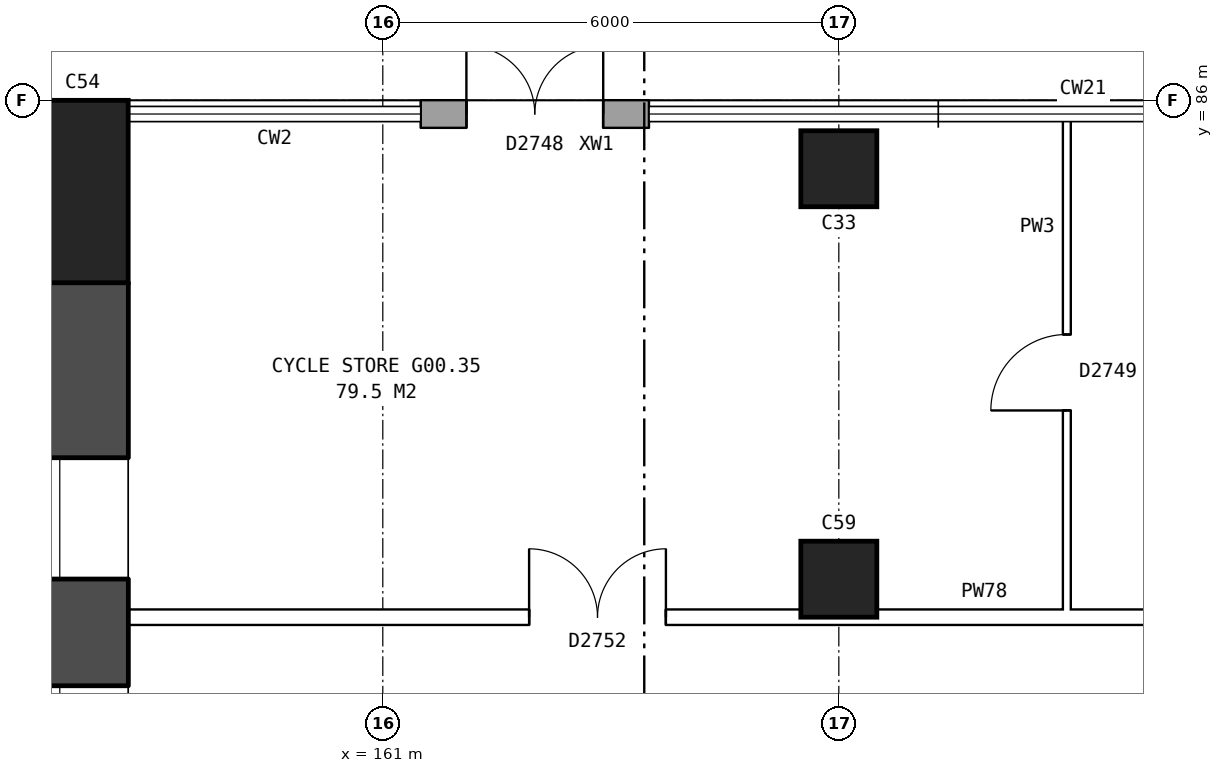
"""IFC4 building model, lengths in metres.
Left out: names, types, materials, properties, quantities, classifications, styles, units other than length and angle.
Written with IfcOpenShell. Run it as: python <this file> out.ifc"""

import sys

from ifc_helpers import new_model, si_unit, direction, frame, frame_2d, origin, origin_2d, place, context, subcontext, project, spatial, rectangle, extrude, element, fill, save


model = new_model("IFC4")
c1 = context("Model", 3, precision=1e-05, world=origin(), true_north=direction((0.0, 1.0)))
c2 = subcontext(c1, "Body", "Model", "MODEL_VIEW")
j1 = project(units=[si_unit("LENGTHUNIT", "METRE"), si_unit("PLANEANGLEUNIT", "RADIAN")], contexts=[c1])
p1 = place(None, origin())
s1 = spatial("IfcSite", under=j1, at=p1, CompositionType="ELEMENT")
p2 = place(p1, origin())
s2 = spatial("IfcBuilding", under=s1, at=p2, CompositionType="ELEMENT")
p3 = place(p2, origin())
s3 = spatial("IfcBuildingStorey", under=s2, at=p3, CompositionType="ELEMENT", Elevation=0.0)
p4 = place(p3, frame((157.05, 84.8, -0.35), z_axis=(0.0, 0.0, 1.0), x_axis=(1.0, 0.0, 0.0)))
e1 = element("IfcColumn", 1, at=p4, inside=s3, PredefinedType="COLUMN", context=c2, shape_type="SweptSolid", body=[
    extrude(rectangle(XDim=1.2, YDim=2.4, at=origin_2d()), origin(), (0.0, 0.0, 1.0), 5.55),
])
p5 = place(p3, frame((157.05, 56.4, -0.35), z_axis=(0.0, 0.0, 1.0), x_axis=(0.0, 1.0, 0.0)))
e2 = element("IfcWall", 2, at=p5, inside=s3, PredefinedType="SHEAR", context=c2, shape_type="SweptSolid", body=[
    extrude(rectangle(XDim=27.2, YDim=1.2, at=frame_2d((13.6, 0.0))), origin(), (0.0, 0.0, 1.0), 5.55),
])
p6 = place(p5, frame((2.3, 0.0, 0.8)))
e3 = element("IfcOpeningElement", 3, at=p6, cuts=e2, PredefinedType="OPENING", context=c2, shape_type="SweptSolid", body=[
    extrude(rectangle(XDim=1.6, YDim=1.8, at=frame_2d((0.8, 0.9))), frame((0.0, 0.61, 0.0), z_axis=(0.0, -1.0, 0.0), x_axis=(1.0, 0.0, 0.0)), (0.0, 0.0, 1.0), 1.22),
])
p7 = place(p5, frame((5.3, 0.0, 0.8)))
e4 = element("IfcOpeningElement", 4, at=p7, cuts=e2, PredefinedType="OPENING", context=c2, shape_type="SweptSolid", body=[
    extrude(rectangle(XDim=1.6, YDim=1.8, at=frame_2d((0.8, 0.9))), frame((0.0, 0.61, 0.0), z_axis=(0.0, -1.0, 0.0), x_axis=(1.0, 0.0, 0.0)), (0.0, 0.0, 1.0), 1.22),
])
p8 = place(p5, frame((8.3, 0.0, 0.8)))
e5 = element("IfcOpeningElement", 5, at=p8, cuts=e2, PredefinedType="OPENING", context=c2, shape_type="SweptSolid", body=[
    extrude(rectangle(XDim=1.6, YDim=1.8, at=frame_2d((0.8, 0.9))), frame((0.0, 0.61, 0.0), z_axis=(0.0, -1.0, 0.0), x_axis=(1.0, 0.0, 0.0)), (0.0, 0.0, 1.0), 1.22),
])
p9 = place(p5, frame((11.3, 0.0, 0.8)))
e6 = element("IfcOpeningElement", 6, at=p9, cuts=e2, PredefinedType="OPENING", context=c2, shape_type="SweptSolid", body=[
    extrude(rectangle(XDim=1.6, YDim=1.8, at=frame_2d((0.8, 0.9))), frame((0.0, 0.61, 0.0), z_axis=(0.0, -1.0, 0.0), x_axis=(1.0, 0.0, 0.0)), (0.0, 0.0, 1.0), 1.22),
])
p10 = place(p5, frame((14.3, 0.0, 0.8)))
e7 = element("IfcOpeningElement", 7, at=p10, cuts=e2, PredefinedType="OPENING", context=c2, shape_type="SweptSolid", body=[
    extrude(rectangle(XDim=1.6, YDim=1.8, at=frame_2d((0.8, 0.9))), frame((0.0, 0.61, 0.0), z_axis=(0.0, -1.0, 0.0), x_axis=(1.0, 0.0, 0.0)), (0.0, 0.0, 1.0), 1.22),
])
p11 = place(p5, frame((17.3, 0.0, 0.8)))
e8 = element("IfcOpeningElement", 8, at=p11, cuts=e2, PredefinedType="OPENING", context=c2, shape_type="SweptSolid", body=[
    extrude(rectangle(XDim=1.6, YDim=1.8, at=frame_2d((0.8, 0.9))), frame((0.0, 0.61, 0.0), z_axis=(0.0, -1.0, 0.0), x_axis=(1.0, 0.0, 0.0)), (0.0, 0.0, 1.0), 1.22),
])
p12 = place(p5, frame((20.3, 0.0, 0.8)))
e9 = element("IfcOpeningElement", 9, at=p12, cuts=e2, PredefinedType="OPENING", context=c2, shape_type="SweptSolid", body=[
    extrude(rectangle(XDim=1.6, YDim=1.8, at=frame_2d((0.8, 0.9))), frame((0.0, 0.61, 0.0), z_axis=(0.0, -1.0, 0.0), x_axis=(1.0, 0.0, 0.0)), (0.0, 0.0, 1.0), 1.22),
])
p13 = place(p5, frame((23.3, 0.0, 0.8)))
e10 = element("IfcOpeningElement", 10, at=p13, cuts=e2, PredefinedType="OPENING", context=c2, shape_type="SweptSolid", body=[
    extrude(rectangle(XDim=1.6, YDim=1.8, at=frame_2d((0.8, 0.9))), frame((0.0, 0.61, 0.0), z_axis=(0.0, -1.0, 0.0), x_axis=(1.0, 0.0, 0.0)), (0.0, 0.0, 1.0), 1.22),
])
for number, where, z_axis, x_axis in (
    (11, (167.0, 79.7, -0.35), (0.0, 0.0, 1.0), (1.0, 0.0, 0.0)),
    (12, (167.0, 85.1, -0.35), (0.0, 0.0, 1.0), (1.0, 0.0, 0.0)),
):
    element("IfcColumn", number, at=place(p3, frame(where, z_axis=z_axis, x_axis=x_axis)), inside=s3, PredefinedType="COLUMN", context=c2, shape_type="SweptSolid", body=[
        extrude(rectangle(XDim=1.0, YDim=1.0, at=origin_2d()), origin(), (0.0, 0.0, 1.0), 5.55),
    ])
p14 = place(p3, frame((164.5, 85.82, 0.0), z_axis=(0.0, 0.0, 1.0), x_axis=(-1.0, 0.0, 0.0)))
e13 = element("IfcWall", 13, at=p14, inside=s3, PredefinedType="STANDARD", context=c2, shape_type="SweptSolid", body=[
    extrude(rectangle(XDim=3.0, YDim=0.36, at=frame_2d((1.5, 0.0))), origin(), (0.0, 0.0, 1.0), 5.2),
])
p15 = place(p14, frame((0.6, 0.0, 0.0)))
e14 = element("IfcOpeningElement", 14, at=p15, cuts=e13, PredefinedType="OPENING", context=c2, shape_type="SweptSolid", body=[
    extrude(rectangle(XDim=1.8, YDim=2.4, at=frame_2d((0.9, 1.2))), frame((0.0, 0.19, 0.0), z_axis=(0.0, -1.0, 0.0), x_axis=(1.0, 0.0, 0.0)), (0.0, 0.0, 1.0), 0.38),
])
p16 = place(p3, frame((157.53, 79.2, 0.0), z_axis=(0.0, 0.0, 1.0), x_axis=(1.0, 0.0, 0.0)))
e15 = element("IfcWall", 15, at=p16, inside=s3, PredefinedType="PARTITIONING", context=c2, shape_type="SweptSolid", body=[
    extrude(rectangle(XDim=15.572, YDim=0.2, at=frame_2d((7.786, 0.0))), origin(), (0.0, 0.0, 1.0), 5.2),
])
p17 = place(p16, frame((5.395, 0.0, 0.0)))
e16 = element("IfcOpeningElement", 16, at=p17, cuts=e15, PredefinedType="OPENING", context=c2, shape_type="SweptSolid", body=[
    extrude(rectangle(XDim=1.8, YDim=2.1, at=frame_2d((0.9, 1.05))), frame((0.0, 0.11, 0.0), z_axis=(0.0, -1.0, 0.0), x_axis=(1.0, 0.0, 0.0)), (0.0, 0.0, 1.0), 0.22),
])
p18 = place(p3, frame((170.0, 79.1, 0.0), z_axis=(0.0, 0.0, 1.0), x_axis=(0.0, 1.0, 0.0)))
e17 = element("IfcWall", 17, at=p18, inside=s3, PredefinedType="PARTITIONING", context=c2, shape_type="SweptSolid", body=[
    extrude(rectangle(XDim=6.66, YDim=0.1, at=frame_2d((3.33, 0.0))), origin(), (0.0, 0.0, 1.0), 5.2),
])
p19 = place(p18, frame((2.82, 0.0, 0.0)))
e18 = element("IfcOpeningElement", 18, at=p19, cuts=e17, PredefinedType="OPENING", context=c2, shape_type="SweptSolid", body=[
    extrude(rectangle(XDim=1.0, YDim=2.1, at=frame_2d((0.5, 1.05))), frame((0.0, 0.06, 0.0), z_axis=(0.0, -1.0, 0.0), x_axis=(1.0, 0.0, 0.0)), (0.0, 0.0, 1.0), 0.12),
])
p20 = place(p15, frame((1.8, 0.0, 0.0), z_axis=(0.0, 0.0, 1.0), x_axis=(-1.0, 0.0, 0.0)))
e19 = element("IfcDoor", 19, at=p20, inside=s3, OperationType="DOUBLE_DOOR_SINGLE_SWING", PredefinedType="DOOR", context=c2, shape_type="SweptSolid", body=[
    extrude(rectangle(XDim=1.8, YDim=2.4, at=frame_2d((0.9, 1.2))), frame((0.0, 0.025, 0.0), z_axis=(0.0, -1.0, 0.0), x_axis=(1.0, 0.0, 0.0)), (0.0, 0.0, 1.0), 0.05),
])
fill(e14, e19)
p21 = place(p12, origin())
e20 = element("IfcWindow", 20, at=p21, inside=s3, PartitioningType="SINGLE_PANEL", PredefinedType="WINDOW", context=c2, shape_type="SweptSolid", body=[
    extrude(rectangle(XDim=1.6, YDim=1.8, at=frame_2d((0.8, 0.9))), frame((0.0, 0.33, 0.0), z_axis=(0.0, -1.0, 0.0), x_axis=(1.0, 0.0, 0.0)), (0.0, 0.0, 1.0), 0.06),
])
fill(e9, e20)
p22 = place(p13, origin())
e21 = element("IfcWindow", 21, at=p22, inside=s3, PartitioningType="SINGLE_PANEL", PredefinedType="WINDOW", context=c2, shape_type="SweptSolid", body=[
    extrude(rectangle(XDim=1.6, YDim=1.8, at=frame_2d((0.8, 0.9))), frame((0.0, 0.33, 0.0), z_axis=(0.0, -1.0, 0.0), x_axis=(1.0, 0.0, 0.0)), (0.0, 0.0, 1.0), 0.06),
])
fill(e10, e21)
p23 = place(p17, origin())
e22 = element("IfcDoor", 22, at=p23, inside=s3, OperationType="DOUBLE_DOOR_SINGLE_SWING", PredefinedType="DOOR", context=c2, shape_type="SweptSolid", body=[
    extrude(rectangle(XDim=1.8, YDim=2.1, at=frame_2d((0.9, 1.05))), frame((0.0, 0.025, 0.0), z_axis=(0.0, -1.0, 0.0), x_axis=(1.0, 0.0, 0.0)), (0.0, 0.0, 1.0), 0.05),
])
fill(e16, e22)
p24 = place(p19, origin())
e23 = element("IfcDoor", 23, at=p24, inside=s3, OperationType="SINGLE_SWING_LEFT", PredefinedType="DOOR", context=c2, shape_type="SweptSolid", body=[
    extrude(rectangle(XDim=1.0, YDim=2.1, at=frame_2d((0.5, 1.05))), frame((0.0, 0.025, 0.0), z_axis=(0.0, -1.0, 0.0), x_axis=(1.0, 0.0, 0.0)), (0.0, 0.0, 1.0), 0.05),
])
fill(e18, e23)
save(model, sys.argv[1])
